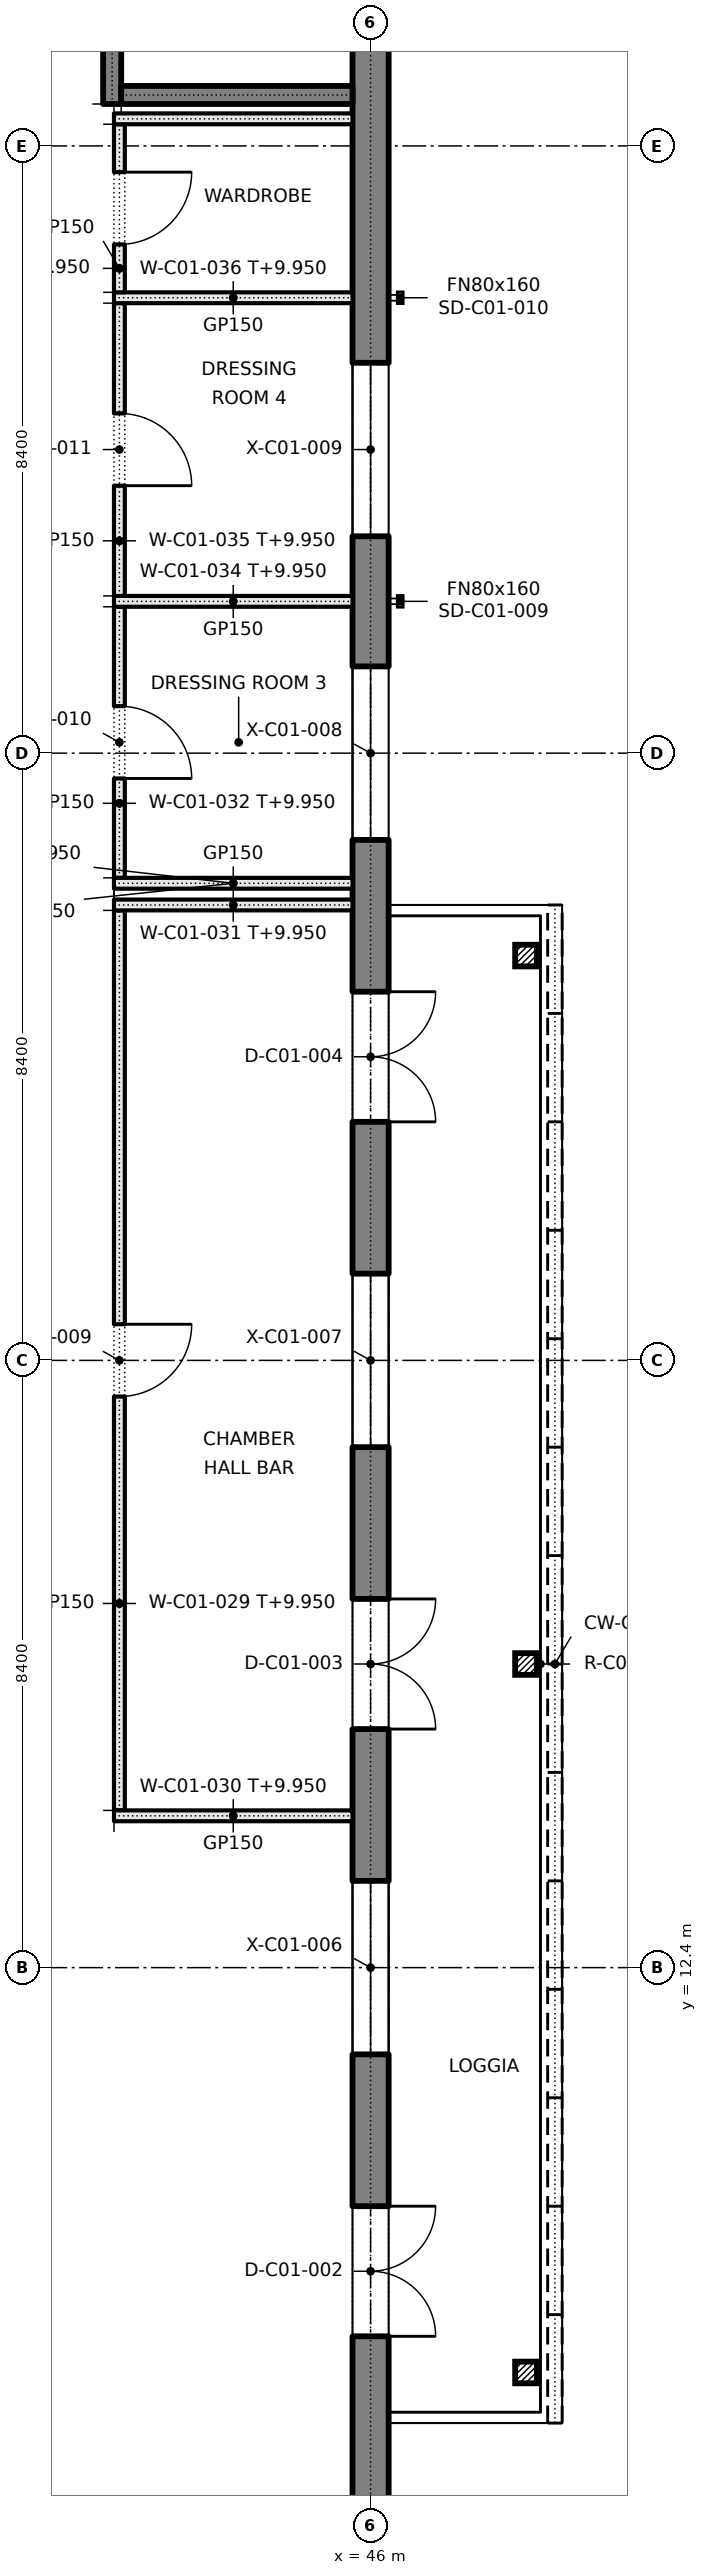
"""IFC4 building model, lengths in metres.
Left out: names, types, materials, properties, quantities, classifications, styles, units other than length and angle.
Written with IfcOpenShell. Run it as: python <this file> out.ifc"""

import sys

from ifc_helpers import new_model, si_unit, direction, frame, frame_2d, origin, origin_2d, place, context, subcontext, project, spatial, rectangle, extrude, element, fill, save


model = new_model("IFC4")
c1 = context("Model", 3, precision=1e-05, world=origin(), true_north=direction((0.0, 1.0)))
c2 = subcontext(c1, "Body", "Model", "MODEL_VIEW")
j1 = project(units=[si_unit("LENGTHUNIT", "METRE"), si_unit("PLANEANGLEUNIT", "RADIAN")], contexts=[c1])
p1 = place(None, origin())
s1 = spatial("IfcSite", under=j1, at=p1, CompositionType="ELEMENT")
p2 = place(p1, origin())
s2 = spatial("IfcBuilding", under=s1, at=p2, CompositionType="ELEMENT")
p3 = place(p2, frame((0.0, 0.0, 5.4)))
s3 = spatial("IfcBuildingStorey", under=s2, at=p3, CompositionType="ELEMENT", Elevation=5.4)
p4 = place(p3, frame((46.0, 3.75, 0.0), z_axis=(0.0, 0.0, 1.0), x_axis=(0.0, 1.0, 0.0)))
e1 = element("IfcWall", 1, at=p4, inside=s3, PredefinedType="SOLIDWALL", context=c2, shape_type="SweptSolid", body=[
    extrude(rectangle(XDim=42.5, YDim=0.5, at=frame_2d((21.25, 0.0))), origin(), (0.0, 0.0, 1.0), 4.8),
])
p5 = place(p4, frame((7.45, 0.0, 0.9)))
e2 = element("IfcOpeningElement", 2, at=p5, cuts=e1, PredefinedType="OPENING", context=c2, shape_type="SweptSolid", body=[
    extrude(rectangle(XDim=2.4, YDim=2.4, at=frame_2d((1.2, 1.2))), frame((0.0, 0.26, 0.0), z_axis=(0.0, -1.0, 0.0), x_axis=(1.0, 0.0, 0.0)), (0.0, 0.0, 1.0), 0.52),
])
p6 = place(p4, frame((15.85, 0.0, 0.9)))
e3 = element("IfcOpeningElement", 3, at=p6, cuts=e1, PredefinedType="OPENING", context=c2, shape_type="SweptSolid", body=[
    extrude(rectangle(XDim=2.4, YDim=2.4, at=frame_2d((1.2, 1.2))), frame((0.0, 0.26, 0.0), z_axis=(0.0, -1.0, 0.0), x_axis=(1.0, 0.0, 0.0)), (0.0, 0.0, 1.0), 0.52),
])
p7 = place(p4, frame((24.25, 0.0, 0.9)))
e4 = element("IfcOpeningElement", 4, at=p7, cuts=e1, PredefinedType="OPENING", context=c2, shape_type="SweptSolid", body=[
    extrude(rectangle(XDim=2.4, YDim=2.4, at=frame_2d((1.2, 1.2))), frame((0.0, 0.26, 0.0), z_axis=(0.0, -1.0, 0.0), x_axis=(1.0, 0.0, 0.0)), (0.0, 0.0, 1.0), 0.52),
])
p8 = place(p4, frame((28.45, 0.0, 0.9)))
e5 = element("IfcOpeningElement", 5, at=p8, cuts=e1, PredefinedType="OPENING", context=c2, shape_type="SweptSolid", body=[
    extrude(rectangle(XDim=2.4, YDim=2.4, at=frame_2d((1.2, 1.2))), frame((0.0, 0.26, 0.0), z_axis=(0.0, -1.0, 0.0), x_axis=(1.0, 0.0, 0.0)), (0.0, 0.0, 1.0), 0.52),
])
p9 = place(p4, frame((3.55, 0.0, 0.0)))
e6 = element("IfcOpeningElement", 6, at=p9, cuts=e1, PredefinedType="OPENING", context=c2, shape_type="SweptSolid", body=[
    extrude(rectangle(XDim=1.8, YDim=2.5, at=frame_2d((0.9, 1.25))), frame((0.0, 0.26, 0.0), z_axis=(0.0, -1.0, 0.0), x_axis=(1.0, 0.0, 0.0)), (0.0, 0.0, 1.0), 0.52),
])
p10 = place(p4, frame((11.95, 0.0, 0.0)))
e7 = element("IfcOpeningElement", 7, at=p10, cuts=e1, PredefinedType="OPENING", context=c2, shape_type="SweptSolid", body=[
    extrude(rectangle(XDim=1.8, YDim=2.5, at=frame_2d((0.9, 1.25))), frame((0.0, 0.26, 0.0), z_axis=(0.0, -1.0, 0.0), x_axis=(1.0, 0.0, 0.0)), (0.0, 0.0, 1.0), 0.52),
])
p11 = place(p4, frame((20.35, 0.0, 0.0)))
e8 = element("IfcOpeningElement", 8, at=p11, cuts=e1, PredefinedType="OPENING", context=c2, shape_type="SweptSolid", body=[
    extrude(rectangle(XDim=1.8, YDim=2.5, at=frame_2d((0.9, 1.25))), frame((0.0, 0.26, 0.0), z_axis=(0.0, -1.0, 0.0), x_axis=(1.0, 0.0, 0.0)), (0.0, 0.0, 1.0), 0.52),
])
p12 = place(p3, frame((42.425, 38.18, 0.0), z_axis=(0.0, 0.0, 1.0), x_axis=(0.0, 1.0, 0.0)))
e9 = element("IfcWall", 9, at=p12, inside=s3, PredefinedType="SOLIDWALL", context=c2, shape_type="SweptSolid", body=[
    extrude(rectangle(XDim=7.57, YDim=0.25, at=frame_2d((3.785, 0.0))), origin(), (0.0, 0.0, 1.0), 4.8),
])
p13 = place(p12, frame((6.17, 0.0, 0.0)))
e10 = element("IfcOpeningElement", 10, at=p13, cuts=e9, PredefinedType="OPENING", context=c2, shape_type="SweptSolid", body=[
    extrude(rectangle(XDim=1.2, YDim=2.1, at=frame_2d((0.6, 1.05))), frame((0.0, 0.135, 0.0), z_axis=(0.0, -1.0, 0.0), x_axis=(1.0, 0.0, 0.0)), (0.0, 0.0, 1.0), 0.27),
])
p14 = place(p3, frame((42.55, 38.305, 0.0), z_axis=(0.0, 0.0, 1.0), x_axis=(1.0, 0.0, 0.0)))
e11 = element("IfcWall", 11, at=p14, inside=s3, PredefinedType="SOLIDWALL", context=c2, shape_type="SweptSolid", body=[
    extrude(rectangle(XDim=3.2, YDim=0.25, at=frame_2d((1.6, 0.0))), origin(), (0.0, 0.0, 1.0), 4.8),
])
for number, where, z_axis, x_axis in (
    (12, (48.15, 6.8, 0.0), (0.0, 0.0, 1.0), (1.0, 0.0, 0.0)),
    (13, (48.15, 16.6, 0.0), (0.0, 0.0, 1.0), (1.0, 0.0, 0.0)),
    (14, (48.15, 26.4, 0.0), (0.0, 0.0, 1.0), (1.0, 0.0, 0.0)),
):
    element("IfcColumn", number, at=place(p3, frame(where, z_axis=z_axis, x_axis=x_axis)), inside=s3, PredefinedType="COLUMN", context=c2, shape_type="SweptSolid", body=[
        extrude(rectangle(XDim=0.3, YDim=0.3, at=origin_2d()), origin(), (0.0, 0.0, 1.0), 4.8),
    ])
p15 = place(p3, frame((42.525, 14.575, 0.0), z_axis=(0.0, 0.0, 1.0), x_axis=(0.0, 1.0, 0.0)))
e15 = element("IfcWall", 15, at=p15, inside=s3, PredefinedType="PARTITIONING", context=c2, shape_type="SweptSolid", body=[
    extrude(rectangle(XDim=12.45, YDim=0.15, at=frame_2d((6.225, 0.0))), origin(), (0.0, 0.0, 1.0), 4.55),
])
p16 = place(p15, frame((5.725, 0.0, 0.0)))
e16 = element("IfcOpeningElement", 16, at=p16, cuts=e15, PredefinedType="OPENING", context=c2, shape_type="SweptSolid", body=[
    extrude(rectangle(XDim=1.0, YDim=2.1, at=frame_2d((0.5, 1.05))), frame((0.0, 0.085, 0.0), z_axis=(0.0, -1.0, 0.0), x_axis=(1.0, 0.0, 0.0)), (0.0, 0.0, 1.0), 0.17),
])
for number, where, z_axis, x_axis in (
    (17, (42.45, 14.5, 0.0), (0.0, 0.0, 1.0), (1.0, 0.0, 0.0)),
    (18, (42.45, 27.1, 0.0), (0.0, 0.0, 1.0), (1.0, 0.0, 0.0)),
):
    element("IfcWall", number, at=place(p3, frame(where, z_axis=z_axis, x_axis=x_axis)), inside=s3, PredefinedType="PARTITIONING", context=c2, shape_type="SweptSolid", body=[
        extrude(rectangle(XDim=3.3, YDim=0.15, at=frame_2d((1.65, 0.0))), origin(), (0.0, 0.0, 1.0), 4.55),
    ])
p17 = place(p3, frame((42.525, 27.475, 0.0), z_axis=(0.0, 0.0, 1.0), x_axis=(0.0, 1.0, 0.0)))
e19 = element("IfcWall", 19, at=p17, inside=s3, PredefinedType="PARTITIONING", context=c2, shape_type="SweptSolid", body=[
    extrude(rectangle(XDim=3.75, YDim=0.15, at=frame_2d((1.875, 0.0))), origin(), (0.0, 0.0, 1.0), 4.55),
])
p18 = place(p17, frame((1.375, 0.0, 0.0)))
e20 = element("IfcOpeningElement", 20, at=p18, cuts=e19, PredefinedType="OPENING", context=c2, shape_type="SweptSolid", body=[
    extrude(rectangle(XDim=1.0, YDim=2.1, at=frame_2d((0.5, 1.05))), frame((0.0, 0.085, 0.0), z_axis=(0.0, -1.0, 0.0), x_axis=(1.0, 0.0, 0.0)), (0.0, 0.0, 1.0), 0.17),
])
for number, where, z_axis, x_axis in (
    (21, (42.45, 27.4, 0.0), (0.0, 0.0, 1.0), (1.0, 0.0, 0.0)),
    (22, (42.45, 31.3, 0.0), (0.0, 0.0, 1.0), (1.0, 0.0, 0.0)),
):
    element("IfcWall", number, at=place(p3, frame(where, z_axis=z_axis, x_axis=x_axis)), inside=s3, PredefinedType="PARTITIONING", context=c2, shape_type="SweptSolid", body=[
        extrude(rectangle(XDim=3.3, YDim=0.15, at=frame_2d((1.65, 0.0))), origin(), (0.0, 0.0, 1.0), 4.55),
    ])
p19 = place(p3, frame((42.525, 31.375, 0.0), z_axis=(0.0, 0.0, 1.0), x_axis=(0.0, 1.0, 0.0)))
e23 = element("IfcWall", 23, at=p19, inside=s3, PredefinedType="PARTITIONING", context=c2, shape_type="SweptSolid", body=[
    extrude(rectangle(XDim=4.05, YDim=0.15, at=frame_2d((2.025, 0.0))), origin(), (0.0, 0.0, 1.0), 4.55),
])
p20 = place(p19, frame((1.525, 0.0, 0.0)))
e24 = element("IfcOpeningElement", 24, at=p20, cuts=e23, PredefinedType="OPENING", context=c2, shape_type="SweptSolid", body=[
    extrude(rectangle(XDim=1.0, YDim=2.1, at=frame_2d((0.5, 1.05))), frame((0.0, 0.085, 0.0), z_axis=(0.0, -1.0, 0.0), x_axis=(1.0, 0.0, 0.0)), (0.0, 0.0, 1.0), 0.17),
])
p21 = place(p3, frame((42.45, 35.5, 0.0), z_axis=(0.0, 0.0, 1.0), x_axis=(1.0, 0.0, 0.0)))
e25 = element("IfcWall", 25, at=p21, inside=s3, PredefinedType="PARTITIONING", context=c2, shape_type="SweptSolid", body=[
    extrude(rectangle(XDim=3.3, YDim=0.15, at=frame_2d((1.65, 0.0))), origin(), (0.0, 0.0, 1.0), 4.55),
])
p22 = place(p3, frame((42.525, 35.575, 0.0), z_axis=(0.0, 0.0, 1.0), x_axis=(0.0, 1.0, 0.0)))
e26 = element("IfcWall", 26, at=p22, inside=s3, PredefinedType="PARTITIONING", context=c2, shape_type="SweptSolid", body=[
    extrude(rectangle(XDim=2.325, YDim=0.15, at=frame_2d((1.163, 0.0))), origin(), (0.0, 0.0, 1.0), 4.55),
])
p23 = place(p22, frame((0.663, 0.0, 0.0)))
e27 = element("IfcOpeningElement", 27, at=p23, cuts=e26, PredefinedType="OPENING", context=c2, shape_type="SweptSolid", body=[
    extrude(rectangle(XDim=1.0, YDim=2.1, at=frame_2d((0.5, 1.05))), frame((0.0, 0.085, 0.0), z_axis=(0.0, -1.0, 0.0), x_axis=(1.0, 0.0, 0.0)), (0.0, 0.0, 1.0), 0.17),
])
p24 = place(p3, frame((42.45, 37.975, 0.0), z_axis=(0.0, 0.0, 1.0), x_axis=(1.0, 0.0, 0.0)))
e28 = element("IfcWall", 28, at=p24, inside=s3, PredefinedType="PARTITIONING", context=c2, shape_type="SweptSolid", body=[
    extrude(rectangle(XDim=3.3, YDim=0.15, at=frame_2d((1.65, 0.0))), origin(), (0.0, 0.0, 1.0), 4.55),
])
p25 = place(p5, origin())
e29 = element("IfcWindow", 29, at=p25, inside=s3, PartitioningType="SINGLE_PANEL", PredefinedType="WINDOW", context=c2, shape_type="SweptSolid", body=[
    extrude(rectangle(XDim=2.4, YDim=2.4, at=frame_2d((1.2, 1.2))), frame((0.0, 0.03, 0.0), z_axis=(0.0, -1.0, 0.0), x_axis=(1.0, 0.0, 0.0)), (0.0, 0.0, 1.0), 0.06),
])
fill(e2, e29)
p26 = place(p6, origin())
e30 = element("IfcWindow", 30, at=p26, inside=s3, PartitioningType="SINGLE_PANEL", PredefinedType="WINDOW", context=c2, shape_type="SweptSolid", body=[
    extrude(rectangle(XDim=2.4, YDim=2.4, at=frame_2d((1.2, 1.2))), frame((0.0, 0.03, 0.0), z_axis=(0.0, -1.0, 0.0), x_axis=(1.0, 0.0, 0.0)), (0.0, 0.0, 1.0), 0.06),
])
fill(e3, e30)
p27 = place(p7, origin())
e31 = element("IfcWindow", 31, at=p27, inside=s3, PartitioningType="SINGLE_PANEL", PredefinedType="WINDOW", context=c2, shape_type="SweptSolid", body=[
    extrude(rectangle(XDim=2.4, YDim=2.4, at=frame_2d((1.2, 1.2))), frame((0.0, 0.03, 0.0), z_axis=(0.0, -1.0, 0.0), x_axis=(1.0, 0.0, 0.0)), (0.0, 0.0, 1.0), 0.06),
])
fill(e4, e31)
p28 = place(p8, origin())
e32 = element("IfcWindow", 32, at=p28, inside=s3, PartitioningType="SINGLE_PANEL", PredefinedType="WINDOW", context=c2, shape_type="SweptSolid", body=[
    extrude(rectangle(XDim=2.4, YDim=2.4, at=frame_2d((1.2, 1.2))), frame((0.0, 0.03, 0.0), z_axis=(0.0, -1.0, 0.0), x_axis=(1.0, 0.0, 0.0)), (0.0, 0.0, 1.0), 0.06),
])
fill(e5, e32)
p29 = place(p9, frame((1.8, 0.0, 0.0), z_axis=(0.0, 0.0, 1.0), x_axis=(-1.0, 0.0, 0.0)))
e33 = element("IfcDoor", 33, at=p29, inside=s3, OperationType="DOUBLE_DOOR_SINGLE_SWING", PredefinedType="DOOR", context=c2, shape_type="SweptSolid", body=[
    extrude(rectangle(XDim=1.8, YDim=2.5, at=frame_2d((0.9, 1.25))), frame((0.0, 0.025, 0.0), z_axis=(0.0, -1.0, 0.0), x_axis=(1.0, 0.0, 0.0)), (0.0, 0.0, 1.0), 0.05),
])
fill(e6, e33)
p30 = place(p10, frame((1.8, 0.0, 0.0), z_axis=(0.0, 0.0, 1.0), x_axis=(-1.0, 0.0, 0.0)))
e34 = element("IfcDoor", 34, at=p30, inside=s3, OperationType="DOUBLE_DOOR_SINGLE_SWING", PredefinedType="DOOR", context=c2, shape_type="SweptSolid", body=[
    extrude(rectangle(XDim=1.8, YDim=2.5, at=frame_2d((0.9, 1.25))), frame((0.0, 0.025, 0.0), z_axis=(0.0, -1.0, 0.0), x_axis=(1.0, 0.0, 0.0)), (0.0, 0.0, 1.0), 0.05),
])
fill(e7, e34)
p31 = place(p11, frame((1.8, 0.0, 0.0), z_axis=(0.0, 0.0, 1.0), x_axis=(-1.0, 0.0, 0.0)))
e35 = element("IfcDoor", 35, at=p31, inside=s3, OperationType="DOUBLE_DOOR_SINGLE_SWING", PredefinedType="DOOR", context=c2, shape_type="SweptSolid", body=[
    extrude(rectangle(XDim=1.8, YDim=2.5, at=frame_2d((0.9, 1.25))), frame((0.0, 0.025, 0.0), z_axis=(0.0, -1.0, 0.0), x_axis=(1.0, 0.0, 0.0)), (0.0, 0.0, 1.0), 0.05),
])
fill(e8, e35)
p32 = place(p16, frame((1.0, 0.0, 0.0), z_axis=(0.0, 0.0, 1.0), x_axis=(-1.0, 0.0, 0.0)))
e36 = element("IfcDoor", 36, at=p32, inside=s3, OperationType="SINGLE_SWING_LEFT", PredefinedType="DOOR", context=c2, shape_type="SweptSolid", body=[
    extrude(rectangle(XDim=1.0, YDim=2.1, at=frame_2d((0.5, 1.05))), frame((0.0, 0.025, 0.0), z_axis=(0.0, -1.0, 0.0), x_axis=(1.0, 0.0, 0.0)), (0.0, 0.0, 1.0), 0.05),
])
fill(e16, e36)
p33 = place(p18, frame((1.0, 0.0, 0.0), z_axis=(0.0, 0.0, 1.0), x_axis=(-1.0, 0.0, 0.0)))
e37 = element("IfcDoor", 37, at=p33, inside=s3, OperationType="SINGLE_SWING_RIGHT", PredefinedType="DOOR", context=c2, shape_type="SweptSolid", body=[
    extrude(rectangle(XDim=1.0, YDim=2.1, at=frame_2d((0.5, 1.05))), frame((0.0, 0.025, 0.0), z_axis=(0.0, -1.0, 0.0), x_axis=(1.0, 0.0, 0.0)), (0.0, 0.0, 1.0), 0.05),
])
fill(e20, e37)
p34 = place(p20, frame((1.0, 0.0, 0.0), z_axis=(0.0, 0.0, 1.0), x_axis=(-1.0, 0.0, 0.0)))
e38 = element("IfcDoor", 38, at=p34, inside=s3, OperationType="SINGLE_SWING_RIGHT", PredefinedType="DOOR", context=c2, shape_type="SweptSolid", body=[
    extrude(rectangle(XDim=1.0, YDim=2.1, at=frame_2d((0.5, 1.05))), frame((0.0, 0.025, 0.0), z_axis=(0.0, -1.0, 0.0), x_axis=(1.0, 0.0, 0.0)), (0.0, 0.0, 1.0), 0.05),
])
fill(e24, e38)
p35 = place(p23, frame((1.0, 0.0, 0.0), z_axis=(0.0, 0.0, 1.0), x_axis=(-1.0, 0.0, 0.0)))
e39 = element("IfcDoor", 39, at=p35, inside=s3, OperationType="SINGLE_SWING_LEFT", PredefinedType="DOOR", context=c2, shape_type="SweptSolid", body=[
    extrude(rectangle(XDim=1.0, YDim=2.1, at=frame_2d((0.5, 1.05))), frame((0.0, 0.025, 0.0), z_axis=(0.0, -1.0, 0.0), x_axis=(1.0, 0.0, 0.0)), (0.0, 0.0, 1.0), 0.05),
])
fill(e27, e39)
save(model, sys.argv[1])
